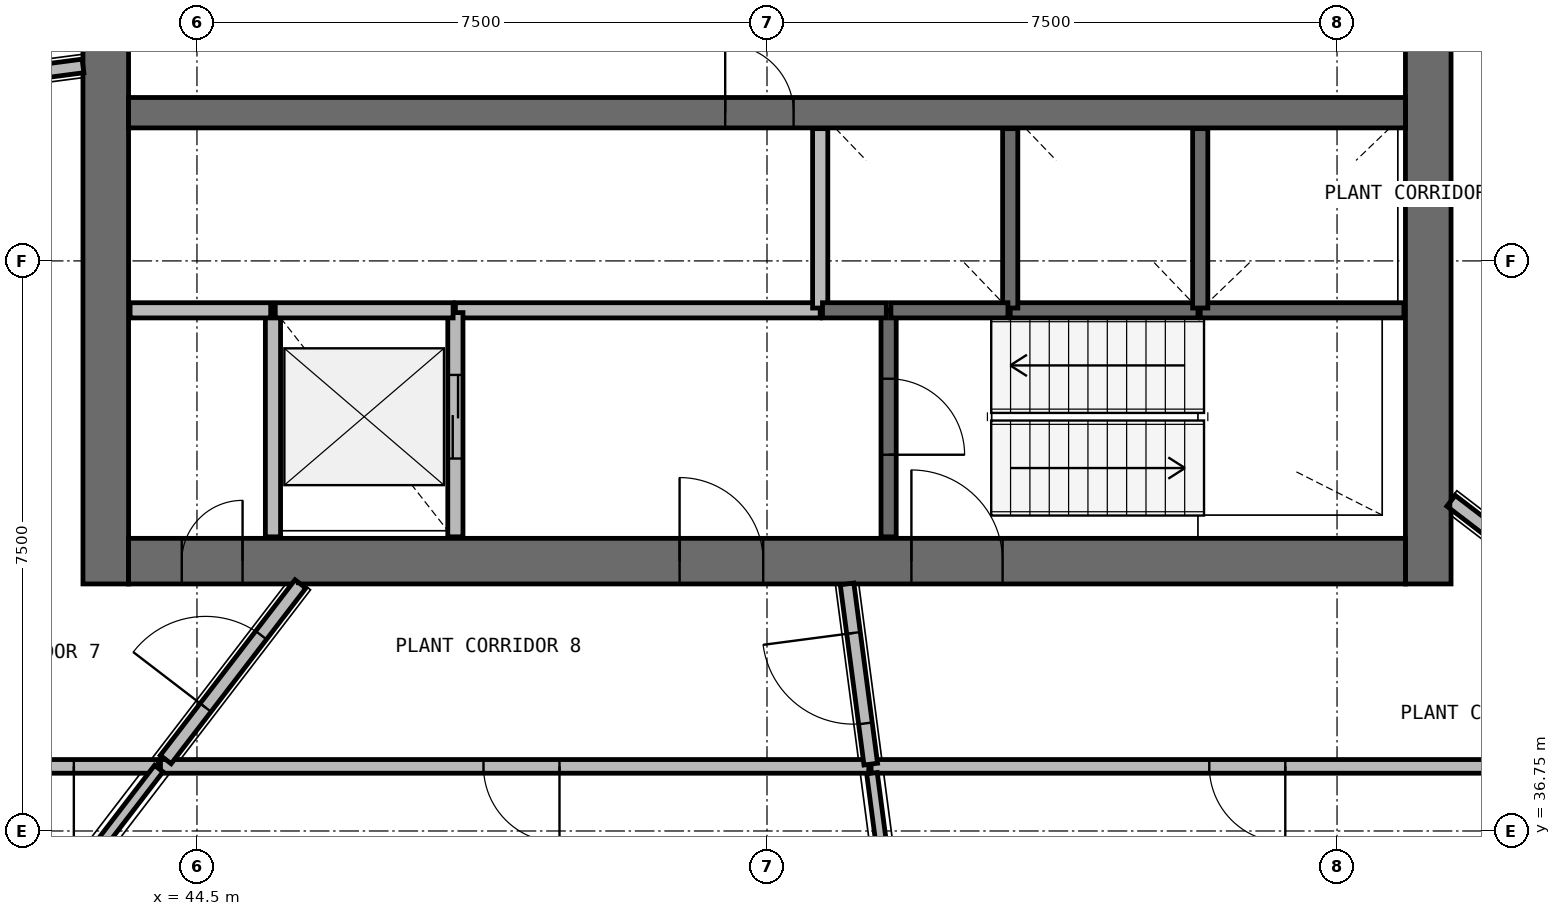
"""IFC4 building model, lengths in metres.
Left out: names, types, materials, properties, quantities, classifications, styles, units other than length and angle.
Written with IfcOpenShell. Run it as: python <this file> out.ifc"""

import sys

from ifc_helpers import new_model, si_unit, direction, frame, frame_2d, origin, place, context, subcontext, project, spatial, rectangle, extrude, source, transform, mapped, element, fill, save


model = new_model("IFC4")
c1 = context("Model", 3, precision=1e-05, world=origin(), true_north=direction((0.0, 1.0)))
c2 = subcontext(c1, "Body", "Model", "MODEL_VIEW")
j1 = project(units=[si_unit("LENGTHUNIT", "METRE"), si_unit("PLANEANGLEUNIT", "RADIAN")], contexts=[c1])
p1 = place(None, origin())
s1 = spatial("IfcSite", under=j1, at=p1, CompositionType="ELEMENT")
p2 = place(p1, origin())
s2 = spatial("IfcBuilding", under=s1, at=p2, CompositionType="ELEMENT")
p3 = place(p2, frame((0.0, 0.0, 230.6)))
s3 = spatial("IfcBuildingStorey", under=s2, at=p3, CompositionType="ELEMENT", Elevation=230.6)
p4 = place(p3, frame((60.7, 40.0, 0.0), z_axis=(0.0, 0.0, 1.0), x_axis=(0.0, 1.0, 0.0)))
e1 = element("IfcWall", 1, at=p4, inside=s3, PredefinedType="SHEAR", context=c2, shape_type="SweptSolid", body=[
    extrude(rectangle(XDim=16.0, YDim=0.6, at=frame_2d((8.0, 0.0))), origin(), (0.0, 0.0, 1.0), 3.9),
])
p5 = place(p4, frame((7.1, 0.0, 0.0)))
e2 = element("IfcOpeningElement", 2, at=p5, cuts=e1, PredefinedType="OPENING", context=c2, shape_type="SweptSolid", body=[
    extrude(rectangle(XDim=1.8, YDim=2.1, at=frame_2d((0.9, 1.05))), frame((0.0, 0.31, 0.0), z_axis=(0.0, -1.0, 0.0), x_axis=(1.0, 0.0, 0.0)), (0.0, 0.0, 1.0), 0.62),
])
p6 = place(p3, frame((43.3, 56.0, 0.0), z_axis=(0.0, 0.0, 1.0), x_axis=(0.0, -1.0, 0.0)))
e3 = element("IfcWall", 3, at=p6, inside=s3, PredefinedType="SHEAR", context=c2, shape_type="SweptSolid", body=[
    extrude(rectangle(XDim=16.0, YDim=0.6, at=frame_2d((8.0, 0.0))), origin(), (0.0, 0.0, 1.0), 3.9),
])
p7 = place(p6, frame((7.1, 0.0, 0.0)))
e4 = element("IfcOpeningElement", 4, at=p7, cuts=e3, PredefinedType="OPENING", context=c2, shape_type="SweptSolid", body=[
    extrude(rectangle(XDim=1.8, YDim=2.1, at=frame_2d((0.9, 1.05))), frame((0.0, 0.31, 0.0), z_axis=(0.0, -1.0, 0.0), x_axis=(1.0, 0.0, 0.0)), (0.0, 0.0, 1.0), 0.62),
])
p8 = place(p3, frame((43.6, 40.3, 0.0), z_axis=(0.0, 0.0, 1.0), x_axis=(1.0, 0.0, 0.0)))
e5 = element("IfcWall", 5, at=p8, inside=s3, PredefinedType="SHEAR", context=c2, shape_type="SweptSolid", body=[
    extrude(rectangle(XDim=16.8, YDim=0.6, at=frame_2d((8.4, 0.0))), origin(), (0.0, 0.0, 1.0), 3.9),
])
p9 = place(p8, frame((10.3, 0.0, 0.0)))
e6 = element("IfcOpeningElement", 6, at=p9, cuts=e5, PredefinedType="OPENING", context=c2, shape_type="SweptSolid", body=[
    extrude(rectangle(XDim=1.2, YDim=2.1, at=frame_2d((0.6, 1.05))), frame((0.0, 0.31, 0.0), z_axis=(0.0, -1.0, 0.0), x_axis=(1.0, 0.0, 0.0)), (0.0, 0.0, 1.0), 0.62),
])
p10 = place(p8, frame((7.25, 0.0, 0.0)))
e7 = element("IfcOpeningElement", 7, at=p10, cuts=e5, PredefinedType="OPENING", context=c2, shape_type="SweptSolid", body=[
    extrude(rectangle(XDim=1.1, YDim=2.1, at=frame_2d((0.55, 1.05))), frame((0.0, 0.31, 0.0), z_axis=(0.0, -1.0, 0.0), x_axis=(1.0, 0.0, 0.0)), (0.0, 0.0, 1.0), 0.62),
])
p11 = place(p8, frame((0.7, 0.0, 0.0)))
e8 = element("IfcOpeningElement", 8, at=p11, cuts=e5, PredefinedType="OPENING", context=c2, shape_type="SweptSolid", body=[
    extrude(rectangle(XDim=0.8, YDim=2.1, at=frame_2d((0.4, 1.05))), frame((0.0, 0.31, 0.0), z_axis=(0.0, -1.0, 0.0), x_axis=(1.0, 0.0, 0.0)), (0.0, 0.0, 1.0), 0.62),
])
p12 = place(p3, frame((43.6, 46.2, 0.0), z_axis=(0.0, 0.0, 1.0), x_axis=(1.0, 0.0, 0.0)))
e9 = element("IfcWall", 9, at=p12, inside=s3, PredefinedType="SHEAR", context=c2, shape_type="SweptSolid", body=[
    extrude(rectangle(XDim=16.8, YDim=0.4, at=frame_2d((8.4, 0.0))), origin(), (0.0, 0.0, 1.0), 3.9),
])
p13 = place(p12, frame((7.85, 0.0, 0.0)))
e10 = element("IfcOpeningElement", 10, at=p13, cuts=e9, PredefinedType="OPENING", context=c2, shape_type="SweptSolid", body=[
    extrude(rectangle(XDim=0.9, YDim=2.1, at=frame_2d((0.45, 1.05))), frame((0.0, 0.21, 0.0), z_axis=(0.0, -1.0, 0.0), x_axis=(1.0, 0.0, 0.0)), (0.0, 0.0, 1.0), 0.42),
])
p14 = place(p3, frame((52.7, 43.6, 0.0), z_axis=(0.0, 0.0, 1.0), x_axis=(-1.0, 0.0, 0.0)))
e11 = element("IfcWall", 11, at=p14, inside=s3, PredefinedType="SOLIDWALL", context=c2, shape_type="SweptSolid", body=[
    extrude(rectangle(XDim=4.8, YDim=0.2, at=frame_2d((2.4, 0.0))), origin(), (0.0, 0.0, 1.0), 3.58),
])
p15 = place(p3, frame((45.5, 43.6, 0.0), z_axis=(0.0, 0.0, 1.0), x_axis=(0.0, -1.0, 0.0)))
e12 = element("IfcWall", 12, at=p15, inside=s3, PredefinedType="SOLIDWALL", context=c2, shape_type="SweptSolid", body=[
    extrude(rectangle(XDim=2.98, YDim=0.2, at=frame_2d((1.49, 0.0))), origin(), (0.0, 0.0, 1.0), 3.58),
])
p16 = place(p3, frame((47.9, 40.62, 0.0), z_axis=(0.0, 0.0, 1.0), x_axis=(0.0, 1.0, 0.0)))
e13 = element("IfcWall", 13, at=p16, inside=s3, PredefinedType="SOLIDWALL", context=c2, shape_type="SweptSolid", body=[
    extrude(rectangle(XDim=2.95, YDim=0.2, at=frame_2d((1.475, 0.0))), origin(), (0.0, 0.0, 1.0), 3.58),
])
p17 = place(p16, frame((1.03, 0.0, 0.0)))
e14 = element("IfcOpeningElement", 14, at=p17, cuts=e13, PredefinedType="OPENING", context=c2, shape_type="SweptSolid", body=[
    extrude(rectangle(XDim=1.1, YDim=2.1, at=frame_2d((0.55, 1.05))), frame((0.0, 0.11, 0.0), z_axis=(0.0, -1.0, 0.0), x_axis=(1.0, 0.0, 0.0)), (0.0, 0.0, 1.0), 0.22),
])
p18 = place(p3, frame((53.6, 43.6, 0.0), z_axis=(0.0, 0.0, 1.0), x_axis=(0.0, -1.0, 0.0)))
e15 = element("IfcWall", 15, at=p18, inside=s3, PredefinedType="SOLIDWALL", context=c2, shape_type="SweptSolid", body=[
    extrude(rectangle(XDim=2.98, YDim=0.2, at=frame_2d((1.49, 0.0))), origin(), (0.0, 0.0, 1.0), 3.58),
])
p19 = place(p18, frame((0.9, 0.0, 0.0)))
e16 = element("IfcOpeningElement", 16, at=p19, cuts=e15, PredefinedType="OPENING", context=c2, shape_type="SweptSolid", body=[
    extrude(rectangle(XDim=1.0, YDim=2.1, at=frame_2d((0.5, 1.05))), frame((0.0, 0.11, 0.0), z_axis=(0.0, -1.0, 0.0), x_axis=(1.0, 0.0, 0.0)), (0.0, 0.0, 1.0), 0.22),
])
p20 = place(p3, frame((57.7, 43.6, 0.0), z_axis=(0.0, 0.0, 1.0), x_axis=(1.0, 0.0, 0.0)))
e17 = element("IfcWall", 17, at=p20, inside=s3, PredefinedType="SOLIDWALL", context=c2, shape_type="SweptSolid", body=[
    extrude(rectangle(XDim=2.68, YDim=0.2, at=frame_2d((1.34, 0.0))), origin(), (0.0, 0.0, 1.0), 3.58),
])
p21 = place(p3, frame((55.2, 43.6, 0.0), z_axis=(0.0, 0.0, 1.0), x_axis=(1.0, 0.0, 0.0)))
e18 = element("IfcWall", 18, at=p21, inside=s3, PredefinedType="SOLIDWALL", context=c2, shape_type="SweptSolid", body=[
    extrude(rectangle(XDim=2.47, YDim=0.2, at=frame_2d((1.235, 0.0))), origin(), (0.0, 0.0, 1.0), 3.58),
])
p22 = place(p3, frame((47.87, 43.6, 0.0), z_axis=(0.0, 0.0, 1.0), x_axis=(-1.0, 0.0, 0.0)))
e19 = element("IfcWall", 19, at=p22, inside=s3, PredefinedType="SOLIDWALL", context=c2, shape_type="SweptSolid", body=[
    extrude(rectangle(XDim=2.34, YDim=0.2, at=frame_2d((1.17, 0.0))), origin(), (0.0, 0.0, 1.0), 3.58),
])
for number, where, z_axis, x_axis in (
    (20, (52.7, 45.99, 0.0), (0.0, 0.0, 1.0), (0.0, -1.0, 0.0)),
    (21, (55.2, 43.63, 0.0), (0.0, 0.0, 1.0), (0.0, 1.0, 0.0)),
    (22, (57.7, 43.63, 0.0), (0.0, 0.0, 1.0), (0.0, 1.0, 0.0)),
):
    element("IfcWall", number, at=place(p3, frame(where, z_axis=z_axis, x_axis=x_axis)), inside=s3, PredefinedType="SOLIDWALL", context=c2, shape_type="SweptSolid", body=[
        extrude(rectangle(XDim=2.36, YDim=0.2, at=frame_2d((1.18, 0.0))), origin(), (0.0, 0.0, 1.0), 3.58),
    ])
p23 = place(p3, frame((45.47, 43.6, 0.0), z_axis=(0.0, 0.0, 1.0), x_axis=(-1.0, 0.0, 0.0)))
e23 = element("IfcWall", 23, at=p23, inside=s3, PredefinedType="SOLIDWALL", context=c2, shape_type="SweptSolid", body=[
    extrude(rectangle(XDim=1.85, YDim=0.2, at=frame_2d((0.925, 0.0))), origin(), (0.0, 0.0, 1.0), 3.58),
])
p24 = place(p3, frame((53.63, 43.6, 0.0), z_axis=(0.0, 0.0, 1.0), x_axis=(1.0, 0.0, 0.0)))
e24 = element("IfcWall", 24, at=p24, inside=s3, PredefinedType="SOLIDWALL", context=c2, shape_type="SweptSolid", body=[
    extrude(rectangle(XDim=1.54, YDim=0.2, at=frame_2d((0.77, 0.0))), origin(), (0.0, 0.0, 1.0), 3.58),
])
p25 = place(p3, frame((52.73, 43.6, 0.0), z_axis=(0.0, 0.0, 1.0), x_axis=(1.0, 0.0, 0.0)))
e25 = element("IfcWall", 25, at=p25, inside=s3, PredefinedType="SOLIDWALL", context=c2, shape_type="SweptSolid", body=[
    extrude(rectangle(XDim=0.84, YDim=0.2, at=frame_2d((0.42, 0.0))), origin(), (0.0, 0.0, 1.0), 3.58),
])
p26 = place(p3, frame((63.4, 37.6, 0.0), z_axis=(0.0, 0.0, 1.0), x_axis=(-1.0, 0.0, 0.0)))
e26 = element("IfcWall", 26, at=p26, inside=s3, PredefinedType="PARTITIONING", context=c2, shape_type="SweptSolid", body=[
    extrude(rectangle(XDim=10.031, YDim=0.18, at=frame_2d((5.015, 0.0))), origin(), (0.0, 0.0, 1.0), 2.38),
])
p27 = place(p26, frame((4.581, 0.0, 0.0)))
e27 = element("IfcOpeningElement", 27, at=p27, cuts=e26, PredefinedType="OPENING", context=c2, shape_type="SweptSolid", body=[
    extrude(rectangle(XDim=1.0, YDim=2.1, at=frame_2d((0.5, 1.05))), frame((0.0, 0.1, 0.0), z_axis=(0.0, -1.0, 0.0), x_axis=(1.0, 0.0, 0.0)), (0.0, 0.0, 1.0), 0.2),
])
p28 = place(p3, frame((53.339, 37.6, 0.0), z_axis=(0.0, 0.0, 1.0), x_axis=(-1.0, 0.0, 0.0)))
e28 = element("IfcWall", 28, at=p28, inside=s3, PredefinedType="PARTITIONING", context=c2, shape_type="SweptSolid", body=[
    extrude(rectangle(XDim=9.319, YDim=0.18, at=frame_2d((4.66, 0.0))), origin(), (0.0, 0.0, 1.0), 2.38),
])
p29 = place(p28, frame((4.069, 0.0, 0.0)))
e29 = element("IfcOpeningElement", 29, at=p29, cuts=e28, PredefinedType="OPENING", context=c2, shape_type="SweptSolid", body=[
    extrude(rectangle(XDim=1.0, YDim=2.1, at=frame_2d((0.5, 1.05))), frame((0.0, 0.1, 0.0), z_axis=(0.0, -1.0, 0.0), x_axis=(1.0, 0.0, 0.0)), (0.0, 0.0, 1.0), 0.2),
])
p30 = place(p3, frame((43.99, 37.6, 0.0), z_axis=(0.0, 0.0, 1.0), x_axis=(-1.0, 0.0, 0.0)))
e30 = element("IfcWall", 30, at=p30, inside=s3, PredefinedType="PARTITIONING", context=c2, shape_type="SweptSolid", body=[
    extrude(rectangle(XDim=3.36, YDim=0.18, at=frame_2d((1.68, 0.0))), origin(), (0.0, 0.0, 1.0), 2.38),
])
p31 = place(p30, frame((1.11, 0.0, 0.0)))
e31 = element("IfcOpeningElement", 31, at=p31, cuts=e30, PredefinedType="OPENING", context=c2, shape_type="SweptSolid", body=[
    extrude(rectangle(XDim=1.0, YDim=2.1, at=frame_2d((0.5, 1.05))), frame((0.0, 0.1, 0.0), z_axis=(0.0, -1.0, 0.0), x_axis=(1.0, 0.0, 0.0)), (0.0, 0.0, 1.0), 0.2),
])
p32 = place(p3, frame((44.089, 37.69, 0.0), z_axis=(0.0, 0.0, 1.0), x_axis=(0.608737787706, 0.793371480341, 0.0)))
e32 = element("IfcWall", 32, at=p32, inside=s3, PredefinedType="PARTITIONING", context=c2, shape_type="SweptSolid", body=[
    extrude(rectangle(XDim=2.912, YDim=0.18, at=frame_2d((1.456, 0.0))), origin(), (0.0, 0.0, 1.0), 2.38),
])
p33 = place(p32, frame((0.862, 0.0, 0.0)))
e33 = element("IfcOpeningElement", 33, at=p33, cuts=e32, PredefinedType="OPENING", context=c2, shape_type="SweptSolid", body=[
    extrude(rectangle(XDim=1.2, YDim=2.1, at=frame_2d((0.6, 1.05))), frame((0.0, 0.1, 0.0), z_axis=(0.0, -1.0, 0.0), x_axis=(1.0, 0.0, 0.0)), (0.0, 0.0, 1.0), 0.2),
])
p34 = place(p3, frame((63.31, 39.322, 0.0), z_axis=(0.0, 0.0, 1.0), x_axis=(-0.793371480341, 0.608737787706, 0.0)))
e34 = element("IfcWall", 34, at=p34, inside=s3, PredefinedType="PARTITIONING", context=c2, shape_type="SweptSolid", body=[
    extrude(rectangle(XDim=2.912, YDim=0.18, at=frame_2d((1.456, 0.0))), origin(), (0.0, 0.0, 1.0), 2.38),
])
p35 = place(p34, frame((0.862, 0.0, 0.0)))
e35 = element("IfcOpeningElement", 35, at=p35, cuts=e34, PredefinedType="OPENING", context=c2, shape_type="SweptSolid", body=[
    extrude(rectangle(XDim=1.2, YDim=2.1, at=frame_2d((0.6, 1.05))), frame((0.0, 0.1, 0.0), z_axis=(0.0, -1.0, 0.0), x_axis=(1.0, 0.0, 0.0)), (0.0, 0.0, 1.0), 0.2),
])
p36 = place(p3, frame((40.69, 46.511, 0.0), z_axis=(0.0, 0.0, 1.0), x_axis=(0.991440737811, 0.130557509967, 0.0)))
e36 = element("IfcWall", 36, at=p36, inside=s3, PredefinedType="PARTITIONING", context=c2, shape_type="SweptSolid", body=[
    extrude(rectangle(XDim=2.33, YDim=0.18, at=frame_2d((1.165, 0.0))), origin(), (0.0, 0.0, 1.0), 2.38),
])
p37 = place(p36, frame((0.48, 0.0, 0.0)))
e37 = element("IfcOpeningElement", 37, at=p37, cuts=e36, PredefinedType="OPENING", context=c2, shape_type="SweptSolid", body=[
    extrude(rectangle(XDim=1.2, YDim=2.1, at=frame_2d((0.6, 1.05))), frame((0.0, 0.1, 0.0), z_axis=(0.0, -1.0, 0.0), x_axis=(1.0, 0.0, 0.0)), (0.0, 0.0, 1.0), 0.2),
])
p38 = place(p3, frame((53.365, 37.63, 0.0), z_axis=(0.0, 0.0, 1.0), x_axis=(-0.130504701654, 0.991447690424, 0.0)))
e38 = element("IfcWall", 38, at=p38, inside=s3, PredefinedType="PARTITIONING", context=c2, shape_type="SweptSolid", body=[
    extrude(rectangle(XDim=2.391, YDim=0.18, at=frame_2d((1.195, 0.0))), origin(), (0.0, 0.0, 1.0), 2.38),
])
p39 = place(p38, frame((0.541, 0.0, 0.0)))
e39 = element("IfcOpeningElement", 39, at=p39, cuts=e38, PredefinedType="OPENING", context=c2, shape_type="SweptSolid", body=[
    extrude(rectangle(XDim=1.2, YDim=2.1, at=frame_2d((0.6, 1.05))), frame((0.0, 0.1, 0.0), z_axis=(0.0, -1.0, 0.0), x_axis=(1.0, 0.0, 0.0)), (0.0, 0.0, 1.0), 0.2),
])
p40 = place(p3, frame((61.058, 36.195, 0.0), z_axis=(0.0, 0.0, 1.0), x_axis=(0.864208311026, 0.503134172118, 0.0)))
e40 = element("IfcWall", 40, at=p40, inside=s3, PredefinedType="PARTITIONING", context=c2, shape_type="SweptSolid", body=[
    extrude(rectangle(XDim=4.162, YDim=0.14, at=frame_2d((2.081, 0.0))), origin(), (0.0, 0.0, 1.0), 2.38),
])
p41 = place(p3, frame((41.983, 34.946, 0.0), z_axis=(0.0, 0.0, 1.0), x_axis=(0.608783144395, 0.793336677017, 0.0)))
e41 = element("IfcWall", 41, at=p41, inside=s3, PredefinedType="PARTITIONING", context=c2, shape_type="SweptSolid", body=[
    extrude(rectangle(XDim=3.309, YDim=0.14, at=frame_2d((1.654, 0.0))), origin(), (0.0, 0.0, 1.0), 2.38),
])
p42 = place(p3, frame((53.381, 37.51, 0.0), z_axis=(0.0, 0.0, 1.0), x_axis=(0.130471833124, -0.991452016369, 0.0)))
e42 = element("IfcWall", 42, at=p42, inside=s3, PredefinedType="PARTITIONING", context=c2, shape_type="SweptSolid", body=[
    extrude(rectangle(XDim=2.552, YDim=0.14, at=frame_2d((1.276, 0.0))), origin(), (0.0, 0.0, 1.0), 2.38),
])
m1 = source(origin(), c2, "Body", "SweptSolid", [
    extrude(rectangle(XDim=1.1, YDim=2.1, at=frame_2d((0.55, 1.05))), frame((0.0, 0.025, 0.0), z_axis=(0.0, -1.0, 0.0), x_axis=(1.0, 0.0, 0.0)), (0.0, 0.0, 1.0), 0.05),
])
p43 = place(p17, origin())
e43 = element("IfcDoor", 43, at=p43, inside=s3, OperationType="DOUBLE_DOOR_SLIDING", PredefinedType="USERDEFINED", context=c2, shape_type="MappedRepresentation", body=[
    mapped(m1, transform((0.0, 0.0, 0.0), scale=1.0)),
])
fill(e14, e43)
m2 = source(origin(), c2, "Body", "SweptSolid", [
    extrude(rectangle(XDim=1.2, YDim=2.1, at=frame_2d((0.6, 1.05))), frame((0.0, 0.025, 0.0), z_axis=(0.0, -1.0, 0.0), x_axis=(1.0, 0.0, 0.0)), (0.0, 0.0, 1.0), 0.05),
])
p44 = place(p9, origin())
e44 = element("IfcDoor", 44, at=p44, inside=s3, OperationType="SINGLE_SWING_LEFT", PredefinedType="DOOR", context=c2, shape_type="MappedRepresentation", body=[
    mapped(m2, transform((0.0, 0.0, 0.0), scale=1.0)),
])
fill(e6, e44)
m3 = source(origin(), c2, "Body", "SweptSolid", [
    extrude(rectangle(XDim=1.0, YDim=2.1, at=frame_2d((0.5, 1.05))), frame((0.0, 0.025, 0.0), z_axis=(0.0, -1.0, 0.0), x_axis=(1.0, 0.0, 0.0)), (0.0, 0.0, 1.0), 0.05),
])
p45 = place(p19, origin())
e45 = element("IfcDoor", 45, at=p45, inside=s3, OperationType="SINGLE_SWING_RIGHT", PredefinedType="DOOR", context=c2, shape_type="MappedRepresentation", body=[
    mapped(m3, transform((0.0, 0.0, 0.0), scale=1.0)),
])
fill(e16, e45)
m4 = source(origin(), c2, "Body", "SweptSolid", [
    extrude(rectangle(XDim=1.1, YDim=2.1, at=frame_2d((0.55, 1.05))), frame((0.0, 0.025, 0.0), z_axis=(0.0, -1.0, 0.0), x_axis=(1.0, 0.0, 0.0)), (0.0, 0.0, 1.0), 0.05),
])
p46 = place(p10, origin())
e46 = element("IfcDoor", 46, at=p46, inside=s3, OperationType="SINGLE_SWING_LEFT", PredefinedType="DOOR", context=c2, shape_type="MappedRepresentation", body=[
    mapped(m4, transform((0.0, 0.0, 0.0), scale=1.0)),
])
fill(e7, e46)
m5 = source(origin(), c2, "Body", "SweptSolid", [
    extrude(rectangle(XDim=0.8, YDim=2.1, at=frame_2d((0.4, 1.05))), frame((0.0, 0.025, 0.0), z_axis=(0.0, -1.0, 0.0), x_axis=(1.0, 0.0, 0.0)), (0.0, 0.0, 1.0), 0.05),
])
p47 = place(p11, origin())
e47 = element("IfcDoor", 47, at=p47, inside=s3, OperationType="SINGLE_SWING_RIGHT", PredefinedType="DOOR", context=c2, shape_type="MappedRepresentation", body=[
    mapped(m5, transform((0.0, 0.0, 0.0), scale=1.0)),
])
fill(e8, e47)
m6 = source(origin(), c2, "Body", "SweptSolid", [
    extrude(rectangle(XDim=1.0, YDim=2.1, at=frame_2d((0.5, 1.05))), frame((0.0, 0.025, 0.0), z_axis=(0.0, -1.0, 0.0), x_axis=(1.0, 0.0, 0.0)), (0.0, 0.0, 1.0), 0.05),
])
p48 = place(p31, origin())
e48 = element("IfcDoor", 48, at=p48, inside=s3, OperationType="SINGLE_SWING_LEFT", PredefinedType="DOOR", context=c2, shape_type="MappedRepresentation", body=[
    mapped(m6, transform((0.0, 0.0, 0.0), scale=1.0)),
])
fill(e31, e48)
p49 = place(p29, origin())
e49 = element("IfcDoor", 49, at=p49, inside=s3, OperationType="SINGLE_SWING_LEFT", PredefinedType="DOOR", context=c2, shape_type="MappedRepresentation", body=[
    mapped(m6, transform((0.0, 0.0, 0.0), scale=1.0)),
])
fill(e29, e49)
p50 = place(p27, origin())
e50 = element("IfcDoor", 50, at=p50, inside=s3, OperationType="SINGLE_SWING_LEFT", PredefinedType="DOOR", context=c2, shape_type="MappedRepresentation", body=[
    mapped(m6, transform((0.0, 0.0, 0.0), scale=1.0)),
])
fill(e27, e50)
m7 = source(origin(), c2, "Body", "SweptSolid", [
    extrude(rectangle(XDim=1.2, YDim=2.1, at=frame_2d((0.6, 1.05))), frame((0.0, 0.025, 0.0), z_axis=(0.0, -1.0, 0.0), x_axis=(1.0, 0.0, 0.0)), (0.0, 0.0, 1.0), 0.05),
])
p51 = place(p33, origin())
e51 = element("IfcDoor", 51, at=p51, inside=s3, OperationType="SINGLE_SWING_LEFT", PredefinedType="DOOR", context=c2, shape_type="MappedRepresentation", body=[
    mapped(m7, transform((0.0, 0.0, 0.0), scale=1.0)),
])
fill(e33, e51)
p52 = place(p39, origin())
e52 = element("IfcDoor", 52, at=p52, inside=s3, OperationType="SINGLE_SWING_RIGHT", PredefinedType="DOOR", context=c2, shape_type="MappedRepresentation", body=[
    mapped(m7, transform((0.0, 0.0, 0.0), scale=1.0)),
])
fill(e39, e52)
m8 = source(origin(), c2, "Body", "SweptSolid", [
    extrude(rectangle(XDim=0.9, YDim=2.1, at=frame_2d((0.45, 1.05))), frame((0.0, 0.025, 0.0), z_axis=(0.0, -1.0, 0.0), x_axis=(1.0, 0.0, 0.0)), (0.0, 0.0, 1.0), 0.05),
])
p53 = place(p13, origin())
e53 = element("IfcDoor", 53, at=p53, inside=s3, OperationType="SINGLE_SWING_LEFT", PredefinedType="DOOR", context=c2, shape_type="MappedRepresentation", body=[
    mapped(m8, transform((0.0, 0.0, 0.0), scale=1.0)),
])
fill(e10, e53)
save(model, sys.argv[1])
